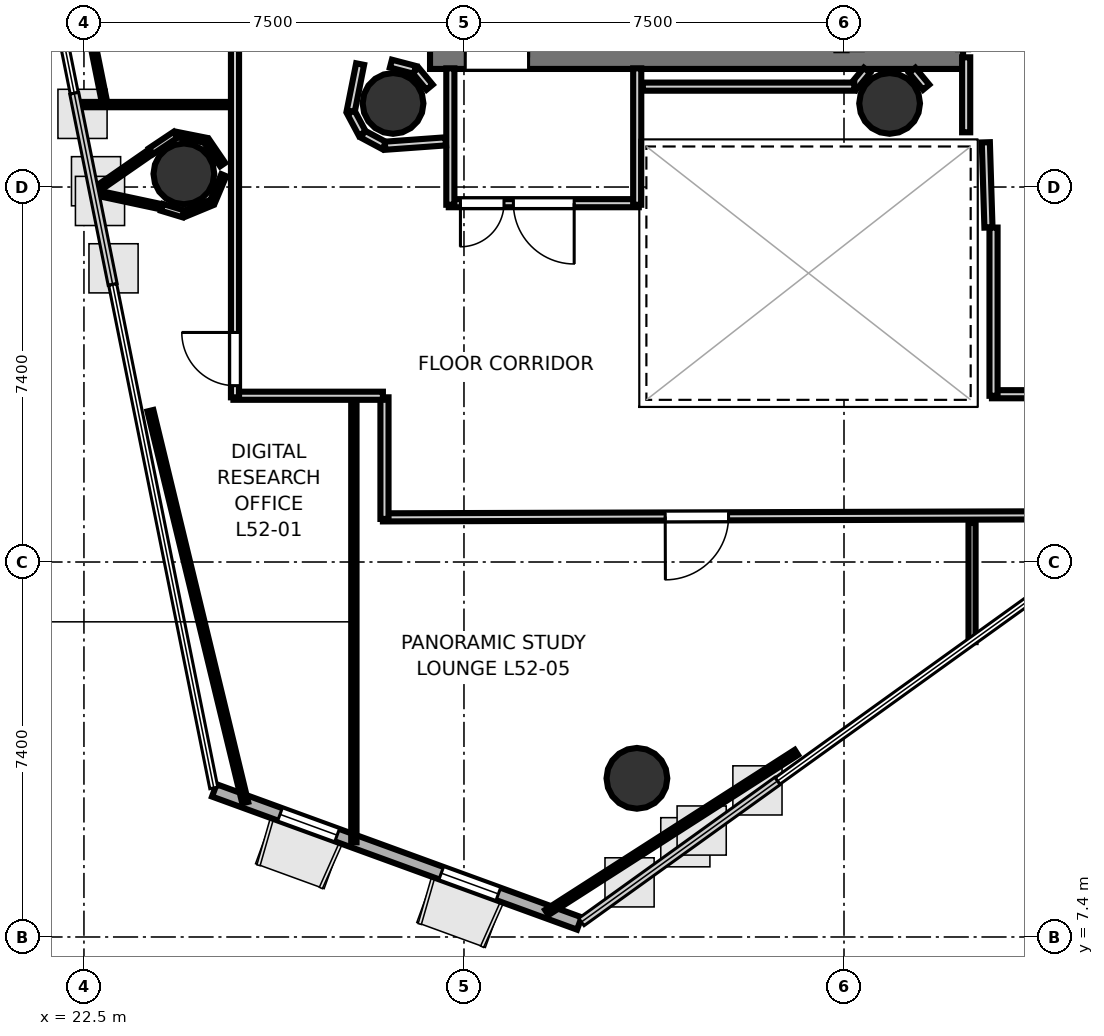
"""IFC4 building model, lengths in metres.
Left out: names, types, materials, properties, quantities, classifications, styles, units other than length and angle.
Written with IfcOpenShell. Run it as: python <this file> out.ifc"""

import sys

from ifc_helpers import new_model, si_unit, direction, frame, frame_2d, origin, origin_2d, place, context, subcontext, project, spatial, rectangle, hollow_circle, extrude, element, fill, save


model = new_model("IFC4")
c1 = context("Model", 3, precision=1e-05, world=origin(), true_north=direction((0.0, 1.0)))
c2 = subcontext(c1, "Body", "Model", "MODEL_VIEW")
j1 = project(units=[si_unit("LENGTHUNIT", "METRE"), si_unit("PLANEANGLEUNIT", "RADIAN")], contexts=[c1])
p1 = place(None, origin())
s1 = spatial("IfcSite", under=j1, at=p1, CompositionType="ELEMENT")
p2 = place(p1, origin())
s2 = spatial("IfcBuilding", under=s1, at=p2, CompositionType="ELEMENT")
p3 = place(p2, frame((0.0, 0.0, 204.0)))
s3 = spatial("IfcBuildingStorey", under=s2, at=p3, CompositionType="ELEMENT", Elevation=204.0)
p4 = place(p3, frame((29.33, 24.755, 0.0), z_axis=(0.0, 0.0, 1.0), x_axis=(1.0, 0.0, 0.0)))
e1 = element("IfcWall", 1, at=p4, inside=s3, PredefinedType="SHEAR", context=c2, shape_type="SweptSolid", body=[
    extrude(rectangle(XDim=10.52, YDim=0.45, at=frame_2d((5.26, 0.0))), origin(), (0.0, 0.0, 1.0), 3.52),
])
p5 = place(p4, frame((0.695, 0.0, 0.0)))
e2 = element("IfcOpeningElement", 2, at=p5, cuts=e1, PredefinedType="OPENING", context=c2, shape_type="SweptSolid", body=[
    extrude(rectangle(XDim=1.25, YDim=2.15, at=frame_2d((0.625, 1.075))), frame((0.0, 0.235, 0.0), z_axis=(0.0, -1.0, 0.0), x_axis=(1.0, 0.0, 0.0)), (0.0, 0.0, 1.0), 0.47),
])
for number, where, z_axis, x_axis in (
    (3, (28.6, 23.85, 0.0), (0.0, 0.0, 1.0), (1.0, 0.0, 0.0)),
    (4, (38.4, 23.85, 0.0), (0.0, 0.0, 1.0), (1.0, 0.0, 0.0)),
    (5, (24.472, 22.46, 0.0), (0.0, 0.0, 1.0), (1.0, 0.0, 0.0)),
    (6, (33.413, 10.531, 0.0), (0.0, 0.0, 1.0), (1.0, 0.0, 0.0)),
):
    element("IfcColumn", number, at=place(p3, frame(where, z_axis=z_axis, x_axis=x_axis)), inside=s3, PredefinedType="COLUMN", context=c2, shape_type="SweptSolid", body=[
        extrude(hollow_circle(Radius=0.6, WallThickness=0.03, at=origin_2d()), origin(), (0.0, 0.0, 1.0), 3.7),
    ])
p6 = place(p3, frame((25.072, 10.293, 0.0), z_axis=(0.0, 0.0, 1.0), x_axis=(0.939543106306, -0.342430651948, 0.0)))
e7 = element("IfcWall", 7, at=p6, inside=s3, PredefinedType="SOLIDWALL", context=c2, shape_type="SweptSolid", body=[
    extrude(rectangle(XDim=7.668, YDim=0.26, at=frame_2d((3.834, 0.0))), origin(), (0.0, 0.0, 1.0), 3.52),
])
p7 = place(p6, frame((1.38, 0.0, 0.9)))
e8 = element("IfcOpeningElement", 8, at=p7, cuts=e7, PredefinedType="OPENING", context=c2, shape_type="SweptSolid", body=[
    extrude(rectangle(XDim=1.2, YDim=2.0, at=frame_2d((0.6, 1.0))), frame((0.0, 0.14, 0.0), z_axis=(0.0, -1.0, 0.0), x_axis=(1.0, 0.0, 0.0)), (0.0, 0.0, 1.0), 0.28),
])
p8 = place(p6, frame((4.768, 0.0, 0.9)))
e9 = element("IfcOpeningElement", 9, at=p8, cuts=e7, PredefinedType="OPENING", context=c2, shape_type="SweptSolid", body=[
    extrude(rectangle(XDim=1.2, YDim=2.0, at=frame_2d((0.6, 1.0))), frame((0.0, 0.14, 0.0), z_axis=(0.0, -1.0, 0.0), x_axis=(1.0, 0.0, 0.0)), (0.0, 0.0, 1.0), 0.28),
])
p9 = place(p3, frame((33.45, 21.881, 0.0), z_axis=(0.0, 0.0, 1.0), x_axis=(-1.0, 0.0, 0.0)))
e10 = element("IfcWall", 10, at=p9, inside=s3, PredefinedType="PARTITIONING", context=c2, shape_type="SweptSolid", body=[
    extrude(rectangle(XDim=3.75, YDim=0.16, at=frame_2d((1.875, 0.0))), origin(), (0.0, 0.0, 1.0), 2.84),
])
p10 = place(p9, frame((1.275, 0.0, 0.0)))
e11 = element("IfcOpeningElement", 11, at=p10, cuts=e10, PredefinedType="OPENING", context=c2, shape_type="SweptSolid", body=[
    extrude(rectangle(XDim=1.2, YDim=2.15, at=frame_2d((0.6, 1.075))), frame((0.0, 0.09, 0.0), z_axis=(0.0, -1.0, 0.0), x_axis=(1.0, 0.0, 0.0)), (0.0, 0.0, 1.0), 0.18),
])
p11 = place(p9, frame((2.66, 0.0, 0.0)))
e12 = element("IfcOpeningElement", 12, at=p11, cuts=e10, PredefinedType="OPENING", context=c2, shape_type="SweptSolid", body=[
    extrude(rectangle(XDim=0.86, YDim=2.05, at=frame_2d((0.43, 1.025))), frame((0.0, 0.09, 0.0), z_axis=(0.0, -1.0, 0.0), x_axis=(1.0, 0.0, 0.0)), (0.0, 0.0, 1.0), 0.18),
])
for number, where, z_axis, x_axis in (
    (13, (29.731, 21.85, 0.0), (0.0, 0.0, 1.0), (0.0, 1.0, 0.0)),
    (14, (33.419, 24.542, 0.0), (0.0, 0.0, 1.0), (0.0, -1.0, 0.0)),
):
    element("IfcWall", number, at=place(p3, frame(where, z_axis=z_axis, x_axis=x_axis)), inside=s3, PredefinedType="PARTITIONING", context=c2, shape_type="SweptSolid", body=[
        extrude(rectangle(XDim=2.692, YDim=0.16, at=frame_2d((1.346, 0.0))), origin(), (0.0, 0.0, 1.0), 2.84),
    ])
p12 = place(p3, frame((40.351, 21.401, 0.0), z_axis=(0.0, 0.0, 1.0), x_axis=(-0.031058045979, 0.999517582527, 0.0)))
e15 = element("IfcWall", 15, at=p12, inside=s3, PredefinedType="PARTITIONING", context=c2, shape_type="SweptSolid", body=[
    extrude(rectangle(XDim=1.682, YDim=0.16, at=frame_2d((0.841, 0.0))), origin(), (0.0, 0.0, 1.0), 2.84),
])
p13 = place(p3, frame((39.911, 23.28, 0.0), z_axis=(0.0, 0.0, 1.0), x_axis=(0.0, 1.0, 0.0)))
e16 = element("IfcWall", 16, at=p13, inside=s3, PredefinedType="PARTITIONING", context=c2, shape_type="SweptSolid", body=[
    extrude(rectangle(XDim=1.48, YDim=0.16, at=frame_2d((0.74, 0.0))), origin(), (0.0, 0.0, 1.0), 2.84),
])
p14 = place(p3, frame((43.15, 18.111, 0.0), z_axis=(0.0, 0.0, 1.0), x_axis=(-1.0, 0.0, 0.0)))
e17 = element("IfcWall", 17, at=p14, inside=s3, PredefinedType="PARTITIONING", context=c2, shape_type="SweptSolid", body=[
    extrude(rectangle(XDim=2.73, YDim=0.16, at=frame_2d((1.365, 0.0))), origin(), (0.0, 0.0, 1.0), 2.84),
])
p15 = place(p14, frame((0.765, 0.0, 0.0)))
e18 = element("IfcOpeningElement", 18, at=p15, cuts=e17, PredefinedType="OPENING", context=c2, shape_type="SweptSolid", body=[
    extrude(rectangle(XDim=1.2, YDim=2.15, at=frame_2d((0.6, 1.075))), frame((0.0, 0.09, 0.0), z_axis=(0.0, -1.0, 0.0), x_axis=(1.0, 0.0, 0.0)), (0.0, 0.0, 1.0), 0.18),
])
p16 = place(p3, frame((40.451, 18.08, 0.0), z_axis=(0.0, 0.0, 1.0), x_axis=(0.0, 1.0, 0.0)))
e19 = element("IfcWall", 19, at=p16, inside=s3, PredefinedType="PARTITIONING", context=c2, shape_type="SweptSolid", body=[
    extrude(rectangle(XDim=3.32, YDim=0.16, at=frame_2d((1.66, 0.0))), origin(), (0.0, 0.0, 1.0), 2.84),
])
p17 = place(p3, frame((29.321, 24.17, 0.0), z_axis=(0.0, 0.0, 1.0), x_axis=(-0.638008265708, 0.770029514296, 0.0)))
e20 = element("IfcWall", 20, at=p17, inside=s3, PredefinedType="PARTITIONING", context=c2, shape_type="SweptSolid", body=[
    extrude(rectangle(XDim=0.431, YDim=0.16, at=frame_2d((0.215, 0.0))), origin(), (0.0, 0.0, 1.0), 2.84),
])
p18 = place(p3, frame((29.03, 24.512, 0.0), z_axis=(0.0, 0.0, 1.0), x_axis=(-0.967681003213, 0.252177469296, 0.0)))
e21 = element("IfcWall", 21, at=p18, inside=s3, PredefinedType="PARTITIONING", context=c2, shape_type="SweptSolid", body=[
    extrude(rectangle(XDim=0.488, YDim=0.16, at=frame_2d((0.244, 0.0))), origin(), (0.0, 0.0, 1.0), 2.84),
])
for number, where, z_axis, x_axis in (
    (22, (39.121, 24.17, 0.0), (0.0, 0.0, 1.0), (-0.638, 0.77, 0.0)),
    (23, (37.954, 24.502, 0.0), (0.0, 0.0, 1.0), (-0.638, -0.77, 0.0)),
):
    element("IfcWall", number, at=place(p3, frame(where, z_axis=z_axis, x_axis=x_axis)), inside=s3, PredefinedType="PARTITIONING", context=c2, shape_type="SweptSolid", body=[
        extrude(rectangle(XDim=0.431, YDim=0.16, at=frame_2d((0.215, 0.0))), origin(), (0.0, 0.0, 1.0), 2.84),
    ])
p19 = place(p3, frame((37.703, 24.181, 0.0), z_axis=(0.0, 0.0, 1.0), x_axis=(-1.0, 0.0, 0.0)))
e24 = element("IfcWall", 24, at=p19, inside=s3, PredefinedType="PARTITIONING", context=c2, shape_type="SweptSolid", body=[
    extrude(rectangle(XDim=4.173, YDim=0.16, at=frame_2d((2.086, 0.0))), origin(), (0.0, 0.0, 1.0), 2.84),
])
p20 = place(p3, frame((27.95, 24.626, 0.0), z_axis=(0.0, 0.0, 1.0), x_axis=(-0.195125950178, -0.980778192848, 0.0)))
e25 = element("IfcWall", 25, at=p20, inside=s3, PredefinedType="PARTITIONING", context=c2, shape_type="SweptSolid", body=[
    extrude(rectangle(XDim=0.948, YDim=0.16, at=frame_2d((0.474, 0.0))), origin(), (0.0, 0.0, 1.0), 2.84),
])
for number, where, z_axis, x_axis in (
    (26, (27.768, 23.675, 0.0), (0.0, 0.0, 1.0), (0.472, -0.882, 0.0)),
    (27, (28.006, 23.243, 0.0), (0.0, 0.0, 1.0), (0.882, -0.472, 0.0)),
):
    element("IfcWall", number, at=place(p3, frame(where, z_axis=z_axis, x_axis=x_axis)), inside=s3, PredefinedType="PARTITIONING", context=c2, shape_type="SweptSolid", body=[
        extrude(rectangle(XDim=0.476, YDim=0.16, at=frame_2d((0.238, 0.0))), origin(), (0.0, 0.0, 1.0), 2.84),
    ])
p21 = place(p3, frame((28.442, 23.015, 0.0), z_axis=(0.0, 0.0, 1.0), x_axis=(0.99740683837, 0.07196942943, 0.0)))
e28 = element("IfcWall", 28, at=p21, inside=s3, PredefinedType="PARTITIONING", context=c2, shape_type="SweptSolid", body=[
    extrude(rectangle(XDim=1.201, YDim=0.16, at=frame_2d((0.601, 0.0))), origin(), (0.0, 0.0, 1.0), 2.84),
])
p22 = place(p3, frame((43.508, 15.727, 0.0), z_axis=(0.0, 0.0, 1.0), x_axis=(-0.999995335964, -0.003054185684, 0.0)))
e29 = element("IfcWall", 29, at=p22, inside=s3, PredefinedType="PARTITIONING", context=c2, shape_type="SweptSolid", body=[
    extrude(rectangle(XDim=15.108, YDim=0.16, at=frame_2d((7.554, 0.0))), origin(), (0.0, 0.0, 1.0), 2.84),
])
p23 = place(p22, frame((8.287, 0.0, 0.0)))
e30 = element("IfcOpeningElement", 30, at=p23, cuts=e29, PredefinedType="OPENING", context=c2, shape_type="SweptSolid", body=[
    extrude(rectangle(XDim=1.25, YDim=2.2, at=frame_2d((0.625, 1.1))), frame((0.0, 0.09, 0.0), z_axis=(0.0, -1.0, 0.0), x_axis=(1.0, 0.0, 0.0)), (0.0, 0.0, 1.0), 0.18),
])
p24 = place(p3, frame((28.431, 15.65, 0.0), z_axis=(0.0, 0.0, 1.0), x_axis=(0.0, 1.0, 0.0)))
e31 = element("IfcWall", 31, at=p24, inside=s3, PredefinedType="PARTITIONING", context=c2, shape_type="SweptSolid", body=[
    extrude(rectangle(XDim=2.4, YDim=0.16, at=frame_2d((1.2, 0.0))), origin(), (0.0, 0.0, 1.0), 2.84),
])
p25 = place(p3, frame((28.4, 18.081, 0.0), z_axis=(0.0, 0.0, 1.0), x_axis=(-1.0, 0.0, 0.0)))
e32 = element("IfcWall", 32, at=p25, inside=s3, PredefinedType="PARTITIONING", context=c2, shape_type="SweptSolid", body=[
    extrude(rectangle(XDim=2.95, YDim=0.16, at=frame_2d((1.475, 0.0))), origin(), (0.0, 0.0, 1.0), 2.84),
])
p26 = place(p3, frame((25.481, 18.05, 0.0), z_axis=(0.0, 0.0, 1.0), x_axis=(0.0, 1.0, 0.0)))
e33 = element("IfcWall", 33, at=p26, inside=s3, PredefinedType="PARTITIONING", context=c2, shape_type="SweptSolid", body=[
    extrude(rectangle(XDim=18.219, YDim=0.16, at=frame_2d((9.109, 0.0))), origin(), (0.0, 0.0, 1.0), 2.84),
])
p27 = place(p26, frame((0.23, 0.0, 0.0)))
e34 = element("IfcOpeningElement", 34, at=p27, cuts=e33, PredefinedType="OPENING", context=c2, shape_type="SweptSolid", body=[
    extrude(rectangle(XDim=1.05, YDim=2.15, at=frame_2d((0.525, 1.075))), frame((0.0, 0.09, 0.0), z_axis=(0.0, -1.0, 0.0), x_axis=(1.0, 0.0, 0.0)), (0.0, 0.0, 1.0), 0.18),
])
p28 = place(p26, frame((9.975, 0.0, 0.0)))
e35 = element("IfcOpeningElement", 35, at=p28, cuts=e33, PredefinedType="OPENING", context=c2, shape_type="SweptSolid", body=[
    extrude(rectangle(XDim=1.25, YDim=2.2, at=frame_2d((0.625, 1.1))), frame((0.0, 0.09, 0.0), z_axis=(0.0, -1.0, 0.0), x_axis=(1.0, 0.0, 0.0)), (0.0, 0.0, 1.0), 0.18),
])
p29 = place(p3, frame((25.238, 22.644, 0.0), z_axis=(0.0, 0.0, 1.0), x_axis=(-0.563363697458, 0.826209019792, 0.0)))
e36 = element("IfcWall", 36, at=p29, inside=s3, PredefinedType="PARTITIONING", context=c2, shape_type="SweptSolid", body=[
    extrude(rectangle(XDim=0.564, YDim=0.12, at=frame_2d((0.282, 0.0))), origin(), (0.0, 0.0, 1.0), 2.84),
])
p30 = place(p3, frame((24.9, 23.122, 0.0), z_axis=(0.0, 0.0, 1.0), x_axis=(-0.980773892286, 0.195147565217, 0.0)))
e37 = element("IfcWall", 37, at=p30, inside=s3, PredefinedType="PARTITIONING", context=c2, shape_type="SweptSolid", body=[
    extrude(rectangle(XDim=0.582, YDim=0.105, at=frame_2d((0.291, 0.0))), origin(), (0.0, 0.0, 1.0), 2.84),
])
p31 = place(p3, frame((24.306, 23.231, 0.0), z_axis=(0.0, 0.0, 1.0), x_axis=(-0.831274401047, -0.555862276256, 0.0)))
e38 = element("IfcWall", 38, at=p31, inside=s3, PredefinedType="PARTITIONING", context=c2, shape_type="SweptSolid", body=[
    extrude(rectangle(XDim=0.582, YDim=0.14, at=frame_2d((0.291, 0.0))), origin(), (0.0, 0.0, 1.0), 2.84),
])
p32 = place(p3, frame((23.81, 22.888, 0.0), z_axis=(0.0, 0.0, 1.0), x_axis=(-0.821958461882, -0.569547440466, 0.0)))
e39 = element("IfcWall", 39, at=p32, inside=s3, PredefinedType="PARTITIONING", context=c2, shape_type="SweptSolid", body=[
    extrude(rectangle(XDim=1.354, YDim=0.12, at=frame_2d((0.677, 0.0))), origin(), (0.0, 0.0, 1.0), 2.095),
])
p33 = place(p3, frame((22.701, 22.094, 0.0), z_axis=(0.0, 0.0, 1.0), x_axis=(0.977868408838, -0.209220876102, 0.0)))
e40 = element("IfcWall", 40, at=p33, inside=s3, PredefinedType="PARTITIONING", context=c2, shape_type="SweptSolid", body=[
    extrude(rectangle(XDim=1.353, YDim=0.105, at=frame_2d((0.676, 0.0))), origin(), (0.0, 0.0, 1.0), 2.095),
])
p34 = place(p3, frame((24.041, 21.798, 0.0), z_axis=(0.0, 0.0, 1.0), x_axis=(0.957015093463, -0.290038119708, 0.0)))
e41 = element("IfcWall", 41, at=p34, inside=s3, PredefinedType="PARTITIONING", context=c2, shape_type="SweptSolid", body=[
    extrude(rectangle(XDim=0.441, YDim=0.14, at=frame_2d((0.221, 0.0))), origin(), (0.0, 0.0, 1.0), 2.84),
])
p35 = place(p3, frame((24.484, 21.671, 0.0), z_axis=(0.0, 0.0, 1.0), x_axis=(0.923832639322, 0.382796622927, 0.0)))
e42 = element("IfcWall", 42, at=p35, inside=s3, PredefinedType="PARTITIONING", context=c2, shape_type="SweptSolid", body=[
    extrude(rectangle(XDim=0.582, YDim=0.12, at=frame_2d((0.291, 0.0))), origin(), (0.0, 0.0, 1.0), 2.84),
])
p36 = place(p3, frame((25.038, 21.91, 0.0), z_axis=(0.0, 0.0, 1.0), x_axis=(0.389093528864, 0.921198255424, 0.0)))
e43 = element("IfcWall", 43, at=p36, inside=s3, PredefinedType="PARTITIONING", context=c2, shape_type="SweptSolid", body=[
    extrude(rectangle(XDim=0.568, YDim=0.105, at=frame_2d((0.284, 0.0))), origin(), (0.0, 0.0, 1.0), 2.84),
])
p37 = place(p3, frame((27.827, 17.97, 0.0), z_axis=(0.0, 0.0, 1.0), x_axis=(0.0, -1.0, 0.0)))
e44 = element("IfcWall", 44, at=p37, inside=s3, PredefinedType="PARTITIONING", context=c2, shape_type="SweptSolid", body=[
    extrude(rectangle(XDim=8.701, YDim=0.105, at=frame_2d((4.351, 0.0))), origin(), (0.0, 0.0, 1.0), 2.84),
])
p38 = place(p3, frame((25.683, 10.052, 0.0), z_axis=(0.0, 0.0, 1.0), x_axis=(-0.235157394154, 0.971957303576, 0.0)))
e45 = element("IfcWall", 45, at=p38, inside=s3, PredefinedType="PARTITIONING", context=c2, shape_type="SweptSolid", body=[
    extrude(rectangle(XDim=7.957, YDim=0.12, at=frame_2d((3.979, 0.0))), origin(), (0.0, 0.0, 1.0), 2.84),
])
p39 = place(p3, frame((22.333, 23.827, 0.0), z_axis=(0.0, 0.0, 1.0), x_axis=(1.0, 0.0, 0.0)))
e46 = element("IfcWall", 46, at=p39, inside=s3, PredefinedType="PARTITIONING", context=c2, shape_type="SweptSolid", body=[
    extrude(rectangle(XDim=3.037, YDim=0.105, at=frame_2d((1.519, 0.0))), origin(), (0.0, 0.0, 1.0), 2.84),
])
p40 = place(p3, frame((22.891, 23.948, 0.0), z_axis=(0.0, 0.0, 1.0), x_axis=(-0.196981324141, 0.980407240865, 0.0)))
e47 = element("IfcWall", 47, at=p40, inside=s3, PredefinedType="PARTITIONING", context=c2, shape_type="SweptSolid", body=[
    extrude(rectangle(XDim=9.604, YDim=0.105, at=frame_2d((4.802, 0.0))), origin(), (0.0, 0.0, 1.0), 2.84),
])
p41 = place(p3, frame((40.027, 15.57, 0.0), z_axis=(0.0, 0.0, 1.0), x_axis=(0.0, -1.0, 0.0)))
e48 = element("IfcWall", 48, at=p41, inside=s3, PredefinedType="PARTITIONING", context=c2, shape_type="SweptSolid", body=[
    extrude(rectangle(XDim=2.351, YDim=0.14, at=frame_2d((1.176, 0.0))), origin(), (0.0, 0.0, 1.0), 2.84),
])
p42 = place(p3, frame((36.56, 11.042, 0.0), z_axis=(0.0, 0.0, 1.0), x_axis=(-0.841833935687, -0.539736625333, 0.0)))
e49 = element("IfcWall", 49, at=p42, inside=s3, PredefinedType="PARTITIONING", context=c2, shape_type="SweptSolid", body=[
    extrude(rectangle(XDim=5.852, YDim=0.12, at=frame_2d((2.926, 0.0))), origin(), (0.0, 0.0, 1.0), 2.84),
])
p43 = place(p5, origin())
e50 = element("IfcDoor", 50, at=p43, inside=s3, OperationType="SINGLE_SWING_RIGHT", PredefinedType="DOOR", context=c2, shape_type="SweptSolid", body=[
    extrude(rectangle(XDim=1.25, YDim=2.15, at=frame_2d((0.625, 1.075))), frame((0.0, 0.025, 0.0), z_axis=(0.0, -1.0, 0.0), x_axis=(1.0, 0.0, 0.0)), (0.0, 0.0, 1.0), 0.05),
])
fill(e2, e50)
p44 = place(p10, origin())
e51 = element("IfcDoor", 51, at=p44, inside=s3, OperationType="SINGLE_SWING_LEFT", PredefinedType="DOOR", context=c2, shape_type="SweptSolid", body=[
    extrude(rectangle(XDim=1.2, YDim=2.15, at=frame_2d((0.6, 1.075))), frame((0.0, 0.025, 0.0), z_axis=(0.0, -1.0, 0.0), x_axis=(1.0, 0.0, 0.0)), (0.0, 0.0, 1.0), 0.05),
])
fill(e11, e51)
p45 = place(p11, origin())
e52 = element("IfcDoor", 52, at=p45, inside=s3, OperationType="SINGLE_SWING_RIGHT", PredefinedType="DOOR", context=c2, shape_type="SweptSolid", body=[
    extrude(rectangle(XDim=0.86, YDim=2.05, at=frame_2d((0.43, 1.025))), frame((0.0, 0.025, 0.0), z_axis=(0.0, -1.0, 0.0), x_axis=(1.0, 0.0, 0.0)), (0.0, 0.0, 1.0), 0.05),
])
fill(e12, e52)
p46 = place(p27, origin())
e53 = element("IfcDoor", 53, at=p46, inside=s3, OperationType="SINGLE_SWING_RIGHT", PredefinedType="DOOR", context=c2, shape_type="SweptSolid", body=[
    extrude(rectangle(XDim=1.05, YDim=2.15, at=frame_2d((0.525, 1.075))), frame((0.0, 0.025, 0.0), z_axis=(0.0, -1.0, 0.0), x_axis=(1.0, 0.0, 0.0)), (0.0, 0.0, 1.0), 0.05),
])
fill(e34, e53)
p47 = place(p23, origin())
e54 = element("IfcDoor", 54, at=p47, inside=s3, OperationType="SINGLE_SWING_RIGHT", PredefinedType="DOOR", context=c2, shape_type="SweptSolid", body=[
    extrude(rectangle(XDim=1.25, YDim=2.2, at=frame_2d((0.625, 1.1))), frame((0.0, 0.025, 0.0), z_axis=(0.0, -1.0, 0.0), x_axis=(1.0, 0.0, 0.0)), (0.0, 0.0, 1.0), 0.05),
])
fill(e30, e54)
p48 = place(p7, origin())
e55 = element("IfcWindow", 55, at=p48, inside=s3, PartitioningType="SINGLE_PANEL", PredefinedType="WINDOW", context=c2, shape_type="SweptSolid", body=[
    extrude(rectangle(XDim=1.2, YDim=2.0, at=frame_2d((0.6, 1.0))), frame((0.0, 0.03, 0.0), z_axis=(0.0, -1.0, 0.0), x_axis=(1.0, 0.0, 0.0)), (0.0, 0.0, 1.0), 0.06),
])
fill(e8, e55)
p49 = place(p8, origin())
e56 = element("IfcWindow", 56, at=p49, inside=s3, PartitioningType="SINGLE_PANEL", PredefinedType="WINDOW", context=c2, shape_type="SweptSolid", body=[
    extrude(rectangle(XDim=1.2, YDim=2.0, at=frame_2d((0.6, 1.0))), frame((0.0, 0.03, 0.0), z_axis=(0.0, -1.0, 0.0), x_axis=(1.0, 0.0, 0.0)), (0.0, 0.0, 1.0), 0.06),
])
fill(e9, e56)
save(model, sys.argv[1])
